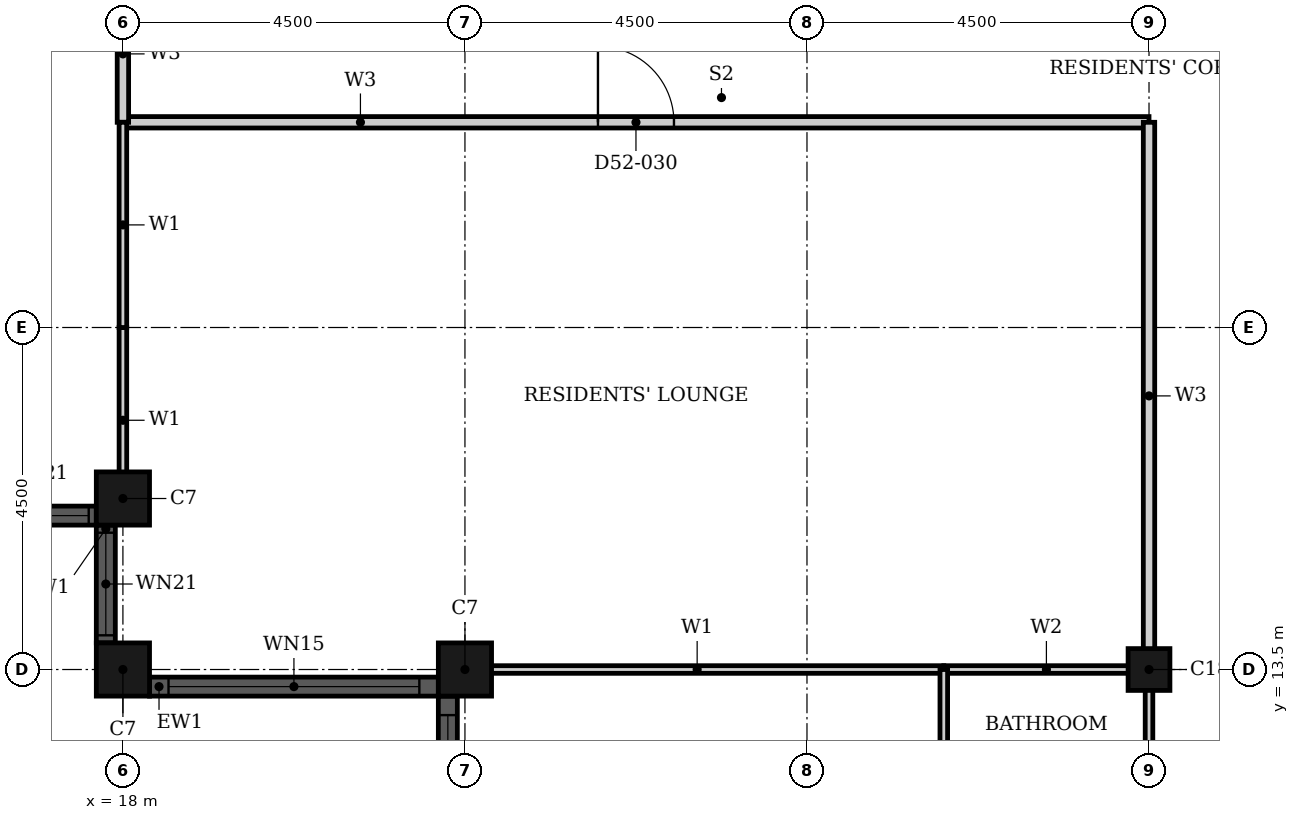
"""IFC4 building model, lengths in metres.
Left out: names, types, materials, properties, quantities, classifications, styles, units other than length and angle.
Written with IfcOpenShell. Run it as: python <this file> out.ifc"""

import sys

from ifc_helpers import new_model, si_unit, direction, frame, frame_2d, origin, origin_2d, place, context, subcontext, project, spatial, rectangle, hollow_rectangle, extrude, element, fill, save


model = new_model("IFC4")
c1 = context("Model", 3, precision=1e-05, world=origin(), true_north=direction((0.0, 1.0)))
c2 = subcontext(c1, "Body", "Model", "MODEL_VIEW")
j1 = project(units=[si_unit("LENGTHUNIT", "METRE"), si_unit("PLANEANGLEUNIT", "RADIAN")], contexts=[c1])
p1 = place(None, origin())
s1 = spatial("IfcSite", under=j1, at=p1, CompositionType="ELEMENT")
p2 = place(p1, origin())
s2 = spatial("IfcBuilding", under=s1, at=p2, CompositionType="ELEMENT")
p3 = place(p2, frame((0.0, 0.0, 207.2)))
s3 = spatial("IfcBuildingStorey", under=s2, at=p3, CompositionType="ELEMENT", Elevation=207.2)
for number, where, z_axis, x_axis in (
    (1, (18.0, 15.75, 0.0), (0.0, 0.0, 1.0), (1.0, 0.0, 0.0)),
    (2, (18.0, 13.5, 0.0), (0.0, 0.0, 1.0), (1.0, 0.0, 0.0)),
    (3, (22.5, 13.5, 0.0), (0.0, 0.0, 1.0), (1.0, 0.0, 0.0)),
):
    element("IfcColumn", number, at=place(p3, frame(where, z_axis=z_axis, x_axis=x_axis)), inside=s3, PredefinedType="COLUMN", context=c2, shape_type="SweptSolid", body=[
        extrude(hollow_rectangle(XDim=0.7, YDim=0.7, WallThickness=0.022, at=origin_2d()), origin(), (0.0, 0.0, 1.0), 3.7),
    ])
p4 = place(p3, frame((31.5, 13.5, 0.0), z_axis=(0.0, 0.0, 1.0), x_axis=(1.0, 0.0, 0.0)))
e4 = element("IfcColumn", 4, at=p4, inside=s3, PredefinedType="COLUMN", context=c2, shape_type="SweptSolid", body=[
    extrude(hollow_rectangle(XDim=0.55, YDim=0.55, WallThickness=0.018, at=origin_2d()), origin(), (0.0, 0.0, 1.0), 3.7),
])
p5 = place(p3, frame((16.1, 15.525, 0.0), z_axis=(0.0, 0.0, 1.0), x_axis=(1.0, 0.0, 0.0)))
e5 = element("IfcWall", 5, at=p5, inside=s3, PredefinedType="SOLIDWALL", context=c2, shape_type="SweptSolid", body=[
    extrude(rectangle(XDim=1.55, YDim=0.25, at=frame_2d((0.775, 0.0))), origin(), (0.0, 0.0, 1.0), 3.7),
])
p6 = place(p5, frame((0.1, 0.0, 0.9)))
e6 = element("IfcOpeningElement", 6, at=p6, cuts=e5, PredefinedType="OPENING", context=c2, shape_type="SweptSolid", body=[
    extrude(rectangle(XDim=1.35, YDim=1.85, at=frame_2d((0.675, 0.925))), frame((0.0, 0.135, 0.0), z_axis=(0.0, -1.0, 0.0), x_axis=(1.0, 0.0, 0.0)), (0.0, 0.0, 1.0), 0.27),
])
p7 = place(p3, frame((17.775, 15.4, 0.0), z_axis=(0.0, 0.0, 1.0), x_axis=(0.0, -1.0, 0.0)))
e7 = element("IfcWall", 7, at=p7, inside=s3, PredefinedType="SOLIDWALL", context=c2, shape_type="SweptSolid", body=[
    extrude(rectangle(XDim=1.55, YDim=0.25, at=frame_2d((0.775, 0.0))), origin(), (0.0, 0.0, 1.0), 3.7),
])
p8 = place(p7, frame((0.1, 0.0, 0.9)))
e8 = element("IfcOpeningElement", 8, at=p8, cuts=e7, PredefinedType="OPENING", context=c2, shape_type="SweptSolid", body=[
    extrude(rectangle(XDim=1.35, YDim=1.85, at=frame_2d((0.675, 0.925))), frame((0.0, 0.135, 0.0), z_axis=(0.0, -1.0, 0.0), x_axis=(1.0, 0.0, 0.0)), (0.0, 0.0, 1.0), 0.27),
])
p9 = place(p3, frame((18.35, 13.275, 0.0), z_axis=(0.0, 0.0, 1.0), x_axis=(1.0, 0.0, 0.0)))
e9 = element("IfcWall", 9, at=p9, inside=s3, PredefinedType="SOLIDWALL", context=c2, shape_type="SweptSolid", body=[
    extrude(rectangle(XDim=3.8, YDim=0.25, at=frame_2d((1.9, 0.0))), origin(), (0.0, 0.0, 1.0), 3.7),
])
p10 = place(p9, frame((0.25, 0.0, 0.45)))
e10 = element("IfcOpeningElement", 10, at=p10, cuts=e9, PredefinedType="OPENING", context=c2, shape_type="SweptSolid", body=[
    extrude(rectangle(XDim=3.3, YDim=2.3, at=frame_2d((1.65, 1.15))), frame((0.0, 0.135, 0.0), z_axis=(0.0, -1.0, 0.0), x_axis=(1.0, 0.0, 0.0)), (0.0, 0.0, 1.0), 0.27),
])
p11 = place(p3, frame((22.275, 13.15, 0.0), z_axis=(0.0, 0.0, 1.0), x_axis=(0.0, -1.0, 0.0)))
e11 = element("IfcWall", 11, at=p11, inside=s3, PredefinedType="SOLIDWALL", context=c2, shape_type="SweptSolid", body=[
    extrude(rectangle(XDim=8.3, YDim=0.25, at=frame_2d((4.15, 0.0))), origin(), (0.0, 0.0, 1.0), 3.7),
])
p12 = place(p11, frame((0.25, 0.0, 0.45)))
e12 = element("IfcOpeningElement", 12, at=p12, cuts=e11, PredefinedType="OPENING", context=c2, shape_type="SweptSolid", body=[
    extrude(rectangle(XDim=3.3, YDim=2.3, at=frame_2d((1.65, 1.15))), frame((0.0, 0.135, 0.0), z_axis=(0.0, -1.0, 0.0), x_axis=(1.0, 0.0, 0.0)), (0.0, 0.0, 1.0), 0.27),
])
p13 = place(p11, frame((4.75, 0.0, 0.45)))
e13 = element("IfcOpeningElement", 13, at=p13, cuts=e11, PredefinedType="OPENING", context=c2, shape_type="SweptSolid", body=[
    extrude(rectangle(XDim=3.3, YDim=2.3, at=frame_2d((1.65, 1.15))), frame((0.0, 0.135, 0.0), z_axis=(0.0, -1.0, 0.0), x_axis=(1.0, 0.0, 0.0)), (0.0, 0.0, 1.0), 0.27),
])
p14 = place(p3, frame((18.0, 20.7, 0.0), z_axis=(0.0, 0.0, 1.0), x_axis=(1.0, 0.0, 0.0)))
e14 = element("IfcWall", 14, at=p14, inside=s3, PredefinedType="PARTITIONING", context=c2, shape_type="SweptSolid", body=[
    extrude(rectangle(XDim=13.5, YDim=0.15, at=frame_2d((6.75, 0.0))), origin(), (0.0, 0.0, 1.0), 3.4),
])
p15 = place(p14, frame((6.25, 0.0, 0.0)))
e15 = element("IfcOpeningElement", 15, at=p15, cuts=e14, PredefinedType="OPENING", context=c2, shape_type="SweptSolid", body=[
    extrude(rectangle(XDim=1.0, YDim=2.1, at=frame_2d((0.5, 1.05))), frame((0.0, 0.085, 0.0), z_axis=(0.0, -1.0, 0.0), x_axis=(1.0, 0.0, 0.0)), (0.0, 0.0, 1.0), 0.17),
])
p16 = place(p3, frame((18.0, 20.7, 0.0), z_axis=(0.0, 0.0, 1.0), x_axis=(0.0, 1.0, 0.0)))
e16 = element("IfcWall", 16, at=p16, inside=s3, PredefinedType="PARTITIONING", context=c2, shape_type="SweptSolid", body=[
    extrude(rectangle(XDim=1.8, YDim=0.15, at=frame_2d((0.9, 0.0))), origin(), (0.0, 0.0, 1.0), 3.4),
])
p17 = place(p3, frame((31.5, 13.5, 0.0), z_axis=(0.0, 0.0, 1.0), x_axis=(0.0, 1.0, 0.0)))
e17 = element("IfcWall", 17, at=p17, inside=s3, PredefinedType="PARTITIONING", context=c2, shape_type="SweptSolid", body=[
    extrude(rectangle(XDim=7.2, YDim=0.15, at=frame_2d((3.6, 0.0))), origin(), (0.0, 0.0, 1.0), 3.4),
])
p18 = place(p3, frame((22.31, 13.5, 0.0), z_axis=(0.0, 0.0, 1.0), x_axis=(1.0, 0.0, 0.0)))
e18 = element("IfcWall", 18, at=p18, inside=s3, PredefinedType="PARTITIONING", context=c2, shape_type="SweptSolid", body=[
    extrude(rectangle(XDim=6.49, YDim=0.1, at=frame_2d((3.245, 0.0))), origin(), (0.0, 0.0, 1.0), 2.48),
])
p19 = place(p3, frame((18.0, 15.56, 0.0), z_axis=(0.0, 0.0, 1.0), x_axis=(0.0, 1.0, 0.0)))
e19 = element("IfcWall", 19, at=p19, inside=s3, PredefinedType="PARTITIONING", context=c2, shape_type="SweptSolid", body=[
    extrude(rectangle(XDim=2.439, YDim=0.1, at=frame_2d((1.219, 0.0))), origin(), (0.0, 0.0, 1.0), 3.4),
])
p20 = place(p3, frame((18.0, 18.0, 0.0), z_axis=(0.0, 0.0, 1.0), x_axis=(0.0, 1.0, 0.0)))
e20 = element("IfcWall", 20, at=p20, inside=s3, PredefinedType="PARTITIONING", context=c2, shape_type="SweptSolid", body=[
    extrude(rectangle(XDim=2.7, YDim=0.1, at=frame_2d((1.35, 0.0))), origin(), (0.0, 0.0, 1.0), 3.4),
])
p21 = place(p3, frame((28.8, 13.5, 0.0), z_axis=(0.0, 0.0, 1.0), x_axis=(1.0, 0.0, 0.0)))
e21 = element("IfcWall", 21, at=p21, inside=s3, PredefinedType="PARTITIONING", context=c2, shape_type="SweptSolid", body=[
    extrude(rectangle(XDim=2.7, YDim=0.1, at=frame_2d((1.35, 0.0))), origin(), (0.0, 0.0, 1.0), 2.48),
])
p22 = place(p3, frame((28.8, 11.1, 0.0), z_axis=(0.0, 0.0, 1.0), x_axis=(0.0, 1.0, 0.0)))
e22 = element("IfcWall", 22, at=p22, inside=s3, PredefinedType="PARTITIONING", context=c2, shape_type="SweptSolid", body=[
    extrude(rectangle(XDim=2.4, YDim=0.1, at=frame_2d((1.2, 0.0))), origin(), (0.0, 0.0, 1.0), 3.4),
])
p23 = place(p3, frame((31.5, 11.1, 0.0), z_axis=(0.0, 0.0, 1.0), x_axis=(0.0, 1.0, 0.0)))
e23 = element("IfcWall", 23, at=p23, inside=s3, PredefinedType="PARTITIONING", context=c2, shape_type="SweptSolid", body=[
    extrude(rectangle(XDim=2.4, YDim=0.1, at=frame_2d((1.2, 0.0))), origin(), (0.0, 0.0, 1.0), 2.68),
])
p24 = place(p6, origin())
e24 = element("IfcWindow", 24, at=p24, inside=s3, PartitioningType="SINGLE_PANEL", PredefinedType="WINDOW", context=c2, shape_type="SweptSolid", body=[
    extrude(rectangle(XDim=1.35, YDim=1.85, at=frame_2d((0.675, 0.925))), frame((0.0, 0.03, 0.0), z_axis=(0.0, -1.0, 0.0), x_axis=(1.0, 0.0, 0.0)), (0.0, 0.0, 1.0), 0.06),
])
fill(e6, e24)
p25 = place(p8, origin())
e25 = element("IfcWindow", 25, at=p25, inside=s3, PartitioningType="SINGLE_PANEL", PredefinedType="WINDOW", context=c2, shape_type="SweptSolid", body=[
    extrude(rectangle(XDim=1.35, YDim=1.85, at=frame_2d((0.675, 0.925))), frame((0.0, 0.03, 0.0), z_axis=(0.0, -1.0, 0.0), x_axis=(1.0, 0.0, 0.0)), (0.0, 0.0, 1.0), 0.06),
])
fill(e8, e25)
p26 = place(p10, origin())
e26 = element("IfcWindow", 26, at=p26, inside=s3, PartitioningType="SINGLE_PANEL", PredefinedType="WINDOW", context=c2, shape_type="SweptSolid", body=[
    extrude(rectangle(XDim=3.3, YDim=2.3, at=frame_2d((1.65, 1.15))), frame((0.0, 0.03, 0.0), z_axis=(0.0, -1.0, 0.0), x_axis=(1.0, 0.0, 0.0)), (0.0, 0.0, 1.0), 0.06),
])
fill(e10, e26)
p27 = place(p12, origin())
e27 = element("IfcWindow", 27, at=p27, inside=s3, PartitioningType="SINGLE_PANEL", PredefinedType="WINDOW", context=c2, shape_type="SweptSolid", body=[
    extrude(rectangle(XDim=3.3, YDim=2.3, at=frame_2d((1.65, 1.15))), frame((0.0, 0.03, 0.0), z_axis=(0.0, -1.0, 0.0), x_axis=(1.0, 0.0, 0.0)), (0.0, 0.0, 1.0), 0.06),
])
fill(e12, e27)
p28 = place(p15, origin())
e28 = element("IfcDoor", 28, at=p28, inside=s3, OperationType="SINGLE_SWING_LEFT", PredefinedType="DOOR", context=c2, shape_type="SweptSolid", body=[
    extrude(rectangle(XDim=1.0, YDim=2.1, at=frame_2d((0.5, 1.05))), frame((0.0, 0.025, 0.0), z_axis=(0.0, -1.0, 0.0), x_axis=(1.0, 0.0, 0.0)), (0.0, 0.0, 1.0), 0.05),
])
fill(e15, e28)
save(model, sys.argv[1])
